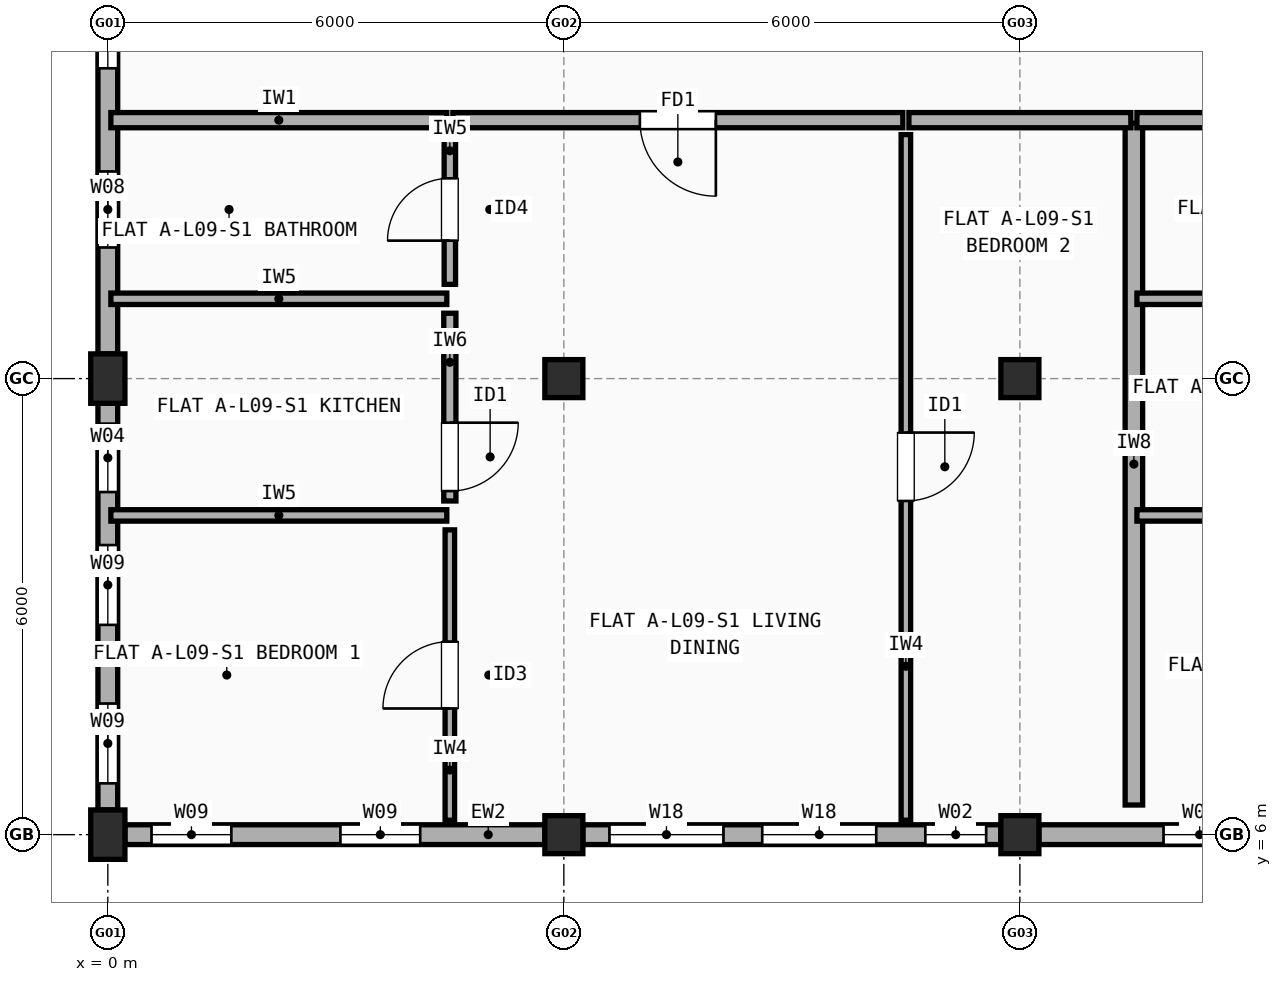
"""IFC4 building model, lengths in metres.
Left out: names, types, materials, properties, quantities, classifications, styles, units other than length and angle.
Written with IfcOpenShell. Run it as: python <this file> out.ifc"""

import sys

from ifc_helpers import new_model, si_unit, direction, frame, frame_2d, origin, origin_2d, place, context, subcontext, project, spatial, rectangle, extrude, element, fill, save


model = new_model("IFC4")
c1 = context("Model", 3, precision=1e-05, world=origin(), true_north=direction((0.0, 1.0)))
c2 = subcontext(c1, "Body", "Model", "MODEL_VIEW")
j1 = project(units=[si_unit("LENGTHUNIT", "METRE"), si_unit("PLANEANGLEUNIT", "RADIAN")], contexts=[c1])
p1 = place(None, origin())
s1 = spatial("IfcSite", under=j1, at=p1, CompositionType="ELEMENT")
p2 = place(p1, origin())
s2 = spatial("IfcBuilding", under=s1, at=p2, CompositionType="ELEMENT")
p3 = place(p2, frame((0.0, 0.0, 30.1)))
s3 = spatial("IfcBuildingStorey", under=s2, at=p3, CompositionType="ELEMENT", Elevation=30.1)
for number, where, z_axis, x_axis in (
    (1, (0.0, 6.0, 0.0), (0.0, 0.0, 1.0), (1.0, 0.0, 0.0)),
    (2, (0.0, 12.0, 0.0), (0.0, 0.0, 1.0), (1.0, 0.0, 0.0)),
):
    element("IfcColumn", number, at=place(p3, frame(where, z_axis=z_axis, x_axis=x_axis)), inside=s3, PredefinedType="COLUMN", context=c2, shape_type="SweptSolid", body=[
        extrude(rectangle(XDim=0.45, YDim=0.65, at=origin_2d()), origin(), (0.0, 0.0, 1.0), 2.985),
    ])
for number, where, z_axis, x_axis in (
    (3, (6.0, 6.0, 0.0), (0.0, 0.0, 1.0), (1.0, 0.0, 0.0)),
    (4, (6.0, 12.0, 0.0), (0.0, 0.0, 1.0), (1.0, 0.0, 0.0)),
    (5, (12.0, 6.0, 0.0), (0.0, 0.0, 1.0), (1.0, 0.0, 0.0)),
    (6, (12.0, 12.0, 0.0), (0.0, 0.0, 1.0), (1.0, 0.0, 0.0)),
):
    element("IfcColumn", number, at=place(p3, frame(where, z_axis=z_axis, x_axis=x_axis)), inside=s3, PredefinedType="COLUMN", context=c2, shape_type="SweptSolid", body=[
        extrude(rectangle(XDim=0.5, YDim=0.5, at=origin_2d()), origin(), (0.0, 0.0, 1.0), 2.985),
    ])
p4 = place(p3, frame((0.225, 6.0, 0.0), z_axis=(0.0, 0.0, 1.0), x_axis=(1.0, 0.0, 0.0)))
e7 = element("IfcWall", 7, at=p4, inside=s3, PredefinedType="STANDARD", context=c2, shape_type="SweptSolid", body=[
    extrude(rectangle(XDim=5.525, YDim=0.26, at=frame_2d((2.762, 0.0))), origin(), (0.0, 0.0, 1.0), 2.467),
])
p5 = place(p4, frame((0.35, 0.0, 0.9)))
e8 = element("IfcOpeningElement", 8, at=p5, cuts=e7, PredefinedType="OPENING", context=c2, shape_type="SweptSolid", body=[
    extrude(rectangle(XDim=1.05, YDim=1.35, at=frame_2d((0.525, 0.675))), frame((0.0, 0.14, 0.0), z_axis=(0.0, -1.0, 0.0), x_axis=(1.0, 0.0, 0.0)), (0.0, 0.0, 1.0), 0.28),
])
p6 = place(p4, frame((2.835, 0.0, 0.9)))
e9 = element("IfcOpeningElement", 9, at=p6, cuts=e7, PredefinedType="OPENING", context=c2, shape_type="SweptSolid", body=[
    extrude(rectangle(XDim=1.05, YDim=1.35, at=frame_2d((0.525, 0.675))), frame((0.0, 0.14, 0.0), z_axis=(0.0, -1.0, 0.0), x_axis=(1.0, 0.0, 0.0)), (0.0, 0.0, 1.0), 0.28),
])
p7 = place(p3, frame((6.25, 6.0, 0.0), z_axis=(0.0, 0.0, 1.0), x_axis=(1.0, 0.0, 0.0)))
e10 = element("IfcWall", 10, at=p7, inside=s3, PredefinedType="STANDARD", context=c2, shape_type="SweptSolid", body=[
    extrude(rectangle(XDim=5.5, YDim=0.26, at=frame_2d((2.75, 0.0))), origin(), (0.0, 0.0, 1.0), 2.467),
])
p8 = place(p7, frame((0.35, 0.0, 0.9)))
e11 = element("IfcOpeningElement", 11, at=p8, cuts=e10, PredefinedType="OPENING", context=c2, shape_type="SweptSolid", body=[
    extrude(rectangle(XDim=1.5, YDim=1.4, at=frame_2d((0.75, 0.7))), frame((0.0, 0.14, 0.0), z_axis=(0.0, -1.0, 0.0), x_axis=(1.0, 0.0, 0.0)), (0.0, 0.0, 1.0), 0.28),
])
p9 = place(p7, frame((2.36, 0.0, 0.9)))
e12 = element("IfcOpeningElement", 12, at=p9, cuts=e10, PredefinedType="OPENING", context=c2, shape_type="SweptSolid", body=[
    extrude(rectangle(XDim=1.5, YDim=1.4, at=frame_2d((0.75, 0.7))), frame((0.0, 0.14, 0.0), z_axis=(0.0, -1.0, 0.0), x_axis=(1.0, 0.0, 0.0)), (0.0, 0.0, 1.0), 0.28),
])
p10 = place(p7, frame((4.506, 0.0, 0.9)))
e13 = element("IfcOpeningElement", 13, at=p10, cuts=e10, PredefinedType="OPENING", context=c2, shape_type="SweptSolid", body=[
    extrude(rectangle(XDim=0.8, YDim=1.2, at=frame_2d((0.4, 0.6))), frame((0.0, 0.14, 0.0), z_axis=(0.0, -1.0, 0.0), x_axis=(1.0, 0.0, 0.0)), (0.0, 0.0, 1.0), 0.28),
])
p11 = place(p3, frame((12.25, 6.0, 0.0), z_axis=(0.0, 0.0, 1.0), x_axis=(1.0, 0.0, 0.0)))
e14 = element("IfcWall", 14, at=p11, inside=s3, PredefinedType="STANDARD", context=c2, shape_type="SweptSolid", body=[
    extrude(rectangle(XDim=5.5, YDim=0.26, at=frame_2d((2.75, 0.0))), origin(), (0.0, 0.0, 1.0), 2.467),
])
p12 = place(p11, frame((1.64, 0.0, 0.9)))
e15 = element("IfcOpeningElement", 15, at=p12, cuts=e14, PredefinedType="OPENING", context=c2, shape_type="SweptSolid", body=[
    extrude(rectangle(XDim=0.95, YDim=1.35, at=frame_2d((0.475, 0.675))), frame((0.0, 0.14, 0.0), z_axis=(0.0, -1.0, 0.0), x_axis=(1.0, 0.0, 0.0)), (0.0, 0.0, 1.0), 0.28),
])
p13 = place(p11, frame((4.2, 0.0, 0.9)))
e16 = element("IfcOpeningElement", 16, at=p13, cuts=e14, PredefinedType="OPENING", context=c2, shape_type="SweptSolid", body=[
    extrude(rectangle(XDim=0.95, YDim=1.35, at=frame_2d((0.475, 0.675))), frame((0.0, 0.14, 0.0), z_axis=(0.0, -1.0, 0.0), x_axis=(1.0, 0.0, 0.0)), (0.0, 0.0, 1.0), 0.28),
])
p14 = place(p3, frame((0.0, 17.675, 0.0), z_axis=(0.0, 0.0, 1.0), x_axis=(0.0, -1.0, 0.0)))
e17 = element("IfcWall", 17, at=p14, inside=s3, PredefinedType="STANDARD", context=c2, shape_type="SweptSolid", body=[
    extrude(rectangle(XDim=5.35, YDim=0.26, at=frame_2d((2.675, 0.0))), origin(), (0.0, 0.0, 1.0), 2.467),
])
p15 = place(p14, frame((0.643, 0.0, 0.9)))
e18 = element("IfcOpeningElement", 18, at=p15, cuts=e17, PredefinedType="OPENING", context=c2, shape_type="SweptSolid", body=[
    extrude(rectangle(XDim=0.95, YDim=1.35, at=frame_2d((0.475, 0.675))), frame((0.0, 0.14, 0.0), z_axis=(0.0, -1.0, 0.0), x_axis=(1.0, 0.0, 0.0)), (0.0, 0.0, 1.0), 0.28),
])
p16 = place(p14, frame((2.95, 0.0, 0.9)))
e19 = element("IfcOpeningElement", 19, at=p16, cuts=e17, PredefinedType="OPENING", context=c2, shape_type="SweptSolid", body=[
    extrude(rectangle(XDim=1.0, YDim=1.4, at=frame_2d((0.5, 0.7))), frame((0.0, 0.14, 0.0), z_axis=(0.0, -1.0, 0.0), x_axis=(1.0, 0.0, 0.0)), (0.0, 0.0, 1.0), 0.28),
])
p17 = place(p3, frame((0.0, 11.675, 0.0), z_axis=(0.0, 0.0, 1.0), x_axis=(0.0, -1.0, 0.0)))
e20 = element("IfcWall", 20, at=p17, inside=s3, PredefinedType="STANDARD", context=c2, shape_type="SweptSolid", body=[
    extrude(rectangle(XDim=5.35, YDim=0.26, at=frame_2d((2.675, 0.0))), origin(), (0.0, 0.0, 1.0), 2.467),
])
p18 = place(p17, frame((0.268, 0.0, 0.9)))
e21 = element("IfcOpeningElement", 21, at=p18, cuts=e20, PredefinedType="OPENING", context=c2, shape_type="SweptSolid", body=[
    extrude(rectangle(XDim=0.9, YDim=1.3, at=frame_2d((0.45, 0.65))), frame((0.0, 0.14, 0.0), z_axis=(0.0, -1.0, 0.0), x_axis=(1.0, 0.0, 0.0)), (0.0, 0.0, 1.0), 0.28),
])
p19 = place(p17, frame((1.865, 0.0, 0.9)))
e22 = element("IfcOpeningElement", 22, at=p19, cuts=e20, PredefinedType="OPENING", context=c2, shape_type="SweptSolid", body=[
    extrude(rectangle(XDim=1.05, YDim=1.35, at=frame_2d((0.525, 0.675))), frame((0.0, 0.14, 0.0), z_axis=(0.0, -1.0, 0.0), x_axis=(1.0, 0.0, 0.0)), (0.0, 0.0, 1.0), 0.28),
])
p20 = place(p17, frame((3.95, 0.0, 0.9)))
e23 = element("IfcOpeningElement", 23, at=p20, cuts=e20, PredefinedType="OPENING", context=c2, shape_type="SweptSolid", body=[
    extrude(rectangle(XDim=1.05, YDim=1.35, at=frame_2d((0.525, 0.675))), frame((0.0, 0.14, 0.0), z_axis=(0.0, -1.0, 0.0), x_axis=(1.0, 0.0, 0.0)), (0.0, 0.0, 1.0), 0.28),
])
p21 = place(p3, frame((13.5, 6.39, 0.0), z_axis=(0.0, 0.0, 1.0), x_axis=(0.0, 1.0, 0.0)))
e24 = element("IfcWall", 24, at=p21, inside=s3, PredefinedType="SOLIDWALL", context=c2, shape_type="SweptSolid", body=[
    extrude(rectangle(XDim=8.97, YDim=0.23, at=frame_2d((4.485, 0.0))), origin(), (0.0, 0.0, 1.0), 2.508),
])
p22 = place(p3, frame((0.04, 15.4, 0.0), z_axis=(0.0, 0.0, 1.0), x_axis=(1.0, 0.0, 0.0)))
e25 = element("IfcWall", 25, at=p22, inside=s3, PredefinedType="SOLIDWALL", context=c2, shape_type="SweptSolid", body=[
    extrude(rectangle(XDim=4.42, YDim=0.2, at=frame_2d((2.21, 0.0))), origin(), (0.0, 0.0, 1.0), 2.467),
])
p23 = place(p3, frame((4.54, 15.4, 0.0), z_axis=(0.0, 0.0, 1.0), x_axis=(1.0, 0.0, 0.0)))
e26 = element("IfcWall", 26, at=p23, inside=s3, PredefinedType="SOLIDWALL", context=c2, shape_type="SweptSolid", body=[
    extrude(rectangle(XDim=5.92, YDim=0.2, at=frame_2d((2.96, 0.0))), origin(), (0.0, 0.0, 1.0), 2.508),
])
p24 = place(p23, frame((2.46, 0.0, 0.0)))
e27 = element("IfcOpeningElement", 27, at=p24, cuts=e26, PredefinedType="OPENING", context=c2, shape_type="SweptSolid", body=[
    extrude(rectangle(XDim=1.0, YDim=2.15, at=frame_2d((0.5, 1.075))), frame((0.0, 0.11, 0.0), z_axis=(0.0, -1.0, 0.0), x_axis=(1.0, 0.0, 0.0)), (0.0, 0.0, 1.0), 0.22),
])
p25 = place(p3, frame((4.5, 6.19, 0.0), z_axis=(0.0, 0.0, 1.0), x_axis=(0.0, 1.0, 0.0)))
e28 = element("IfcWall", 28, at=p25, inside=s3, PredefinedType="PARTITIONING", context=c2, shape_type="SweptSolid", body=[
    extrude(rectangle(XDim=3.82, YDim=0.125, at=frame_2d((1.91, 0.0))), origin(), (0.0, 0.0, 1.0), 2.985),
])
p26 = place(p25, frame((1.47, 0.0, 0.0)))
e29 = element("IfcOpeningElement", 29, at=p26, cuts=e28, PredefinedType="OPENING", context=c2, shape_type="SweptSolid", body=[
    extrude(rectangle(XDim=0.88, YDim=2.1, at=frame_2d((0.44, 1.05))), frame((0.0, 0.073, 0.0), z_axis=(0.0, -1.0, 0.0), x_axis=(1.0, 0.0, 0.0)), (0.0, 0.0, 1.0), 0.145),
])
p27 = place(p3, frame((4.5, 10.39, 0.0), z_axis=(0.0, 0.0, 1.0), x_axis=(0.0, 1.0, 0.0)))
e30 = element("IfcWall", 30, at=p27, inside=s3, PredefinedType="PLUMBINGWALL", context=c2, shape_type="SweptSolid", body=[
    extrude(rectangle(XDim=2.47, YDim=0.16, at=frame_2d((1.235, 0.0))), origin(), (0.0, 0.0, 1.0), 2.408),
])
p28 = place(p27, frame((0.13, 0.0, 0.0)))
e31 = element("IfcOpeningElement", 31, at=p28, cuts=e30, PredefinedType="OPENING", context=c2, shape_type="SweptSolid", body=[
    extrude(rectangle(XDim=0.9, YDim=2.1, at=frame_2d((0.45, 1.05))), frame((0.0, 0.09, 0.0), z_axis=(0.0, -1.0, 0.0), x_axis=(1.0, 0.0, 0.0)), (0.0, 0.0, 1.0), 0.18),
])
p29 = place(p3, frame((4.5, 13.24, 0.0), z_axis=(0.0, 0.0, 1.0), x_axis=(0.0, 1.0, 0.0)))
e32 = element("IfcWall", 32, at=p29, inside=s3, PredefinedType="PARTITIONING", context=c2, shape_type="SweptSolid", body=[
    extrude(rectangle(XDim=1.97, YDim=0.15, at=frame_2d((0.985, 0.0))), origin(), (0.0, 0.0, 1.0), 2.985),
])
p30 = place(p29, frame((0.575, 0.0, 0.0)))
e33 = element("IfcOpeningElement", 33, at=p30, cuts=e32, PredefinedType="OPENING", context=c2, shape_type="SweptSolid", body=[
    extrude(rectangle(XDim=0.82, YDim=2.08, at=frame_2d((0.41, 1.04))), frame((0.0, 0.085, 0.0), z_axis=(0.0, -1.0, 0.0), x_axis=(1.0, 0.0, 0.0)), (0.0, 0.0, 1.0), 0.17),
])
for number, where, z_axis, x_axis in (
    (34, (0.04, 10.2, 0.0), (0.0, 0.0, 1.0), (1.0, 0.0, 0.0)),
    (35, (0.04, 13.05, 0.0), (0.0, 0.0, 1.0), (1.0, 0.0, 0.0)),
):
    element("IfcWall", number, at=place(p3, frame(where, z_axis=z_axis, x_axis=x_axis)), inside=s3, PredefinedType="PARTITIONING", context=c2, shape_type="SweptSolid", body=[
        extrude(rectangle(XDim=4.42, YDim=0.15, at=frame_2d((2.21, 0.0))), origin(), (0.0, 0.0, 1.0), 2.467),
    ])
p31 = place(p3, frame((10.54, 15.4, 0.0), z_axis=(0.0, 0.0, 1.0), x_axis=(1.0, 0.0, 0.0)))
e36 = element("IfcWall", 36, at=p31, inside=s3, PredefinedType="SOLIDWALL", context=c2, shape_type="SweptSolid", body=[
    extrude(rectangle(XDim=2.92, YDim=0.2, at=frame_2d((1.46, 0.0))), origin(), (0.0, 0.0, 1.0), 2.508),
])
p32 = place(p3, frame((10.5, 6.19, 0.0), z_axis=(0.0, 0.0, 1.0), x_axis=(0.0, 1.0, 0.0)))
e37 = element("IfcWall", 37, at=p32, inside=s3, PredefinedType="PARTITIONING", context=c2, shape_type="SweptSolid", body=[
    extrude(rectangle(XDim=9.02, YDim=0.125, at=frame_2d((4.51, 0.0))), origin(), (0.0, 0.0, 1.0), 2.548),
])
p33 = place(p32, frame((4.2, 0.0, 0.0)))
e38 = element("IfcOpeningElement", 38, at=p33, cuts=e37, PredefinedType="OPENING", context=c2, shape_type="SweptSolid", body=[
    extrude(rectangle(XDim=0.9, YDim=2.1, at=frame_2d((0.45, 1.05))), frame((0.0, 0.073, 0.0), z_axis=(0.0, -1.0, 0.0), x_axis=(1.0, 0.0, 0.0)), (0.0, 0.0, 1.0), 0.145),
])
p34 = place(p3, frame((13.54, 15.4, 0.0), z_axis=(0.0, 0.0, 1.0), x_axis=(1.0, 0.0, 0.0)))
e39 = element("IfcWall", 39, at=p34, inside=s3, PredefinedType="SOLIDWALL", context=c2, shape_type="SweptSolid", body=[
    extrude(rectangle(XDim=4.42, YDim=0.2, at=frame_2d((2.21, 0.0))), origin(), (0.0, 0.0, 1.0), 2.458),
])
p35 = place(p3, frame((13.54, 10.2, 0.0), z_axis=(0.0, 0.0, 1.0), x_axis=(1.0, 0.0, 0.0)))
e40 = element("IfcWall", 40, at=p35, inside=s3, PredefinedType="PARTITIONING", context=c2, shape_type="SweptSolid", body=[
    extrude(rectangle(XDim=4.42, YDim=0.15, at=frame_2d((2.21, 0.0))), origin(), (0.0, 0.0, 1.0), 2.508),
])
p36 = place(p3, frame((13.54, 13.05, 0.0), z_axis=(0.0, 0.0, 1.0), x_axis=(1.0, 0.0, 0.0)))
e41 = element("IfcWall", 41, at=p36, inside=s3, PredefinedType="PARTITIONING", context=c2, shape_type="SweptSolid", body=[
    extrude(rectangle(XDim=4.42, YDim=0.15, at=frame_2d((2.21, 0.0))), origin(), (0.0, 0.0, 1.0), 2.458),
])
p37 = place(p5, origin())
e42 = element("IfcWindow", 42, at=p37, inside=s3, PartitioningType="SINGLE_PANEL", PredefinedType="WINDOW", context=c2, shape_type="SweptSolid", body=[
    extrude(rectangle(XDim=1.05, YDim=1.35, at=frame_2d((0.525, 0.675))), frame((0.0, 0.03, 0.0), z_axis=(0.0, -1.0, 0.0), x_axis=(1.0, 0.0, 0.0)), (0.0, 0.0, 1.0), 0.06),
])
fill(e8, e42)
p38 = place(p6, origin())
e43 = element("IfcWindow", 43, at=p38, inside=s3, PartitioningType="SINGLE_PANEL", PredefinedType="WINDOW", context=c2, shape_type="SweptSolid", body=[
    extrude(rectangle(XDim=1.05, YDim=1.35, at=frame_2d((0.525, 0.675))), frame((0.0, 0.03, 0.0), z_axis=(0.0, -1.0, 0.0), x_axis=(1.0, 0.0, 0.0)), (0.0, 0.0, 1.0), 0.06),
])
fill(e9, e43)
p39 = place(p8, origin())
e44 = element("IfcWindow", 44, at=p39, inside=s3, PartitioningType="SINGLE_PANEL", PredefinedType="WINDOW", context=c2, shape_type="SweptSolid", body=[
    extrude(rectangle(XDim=1.5, YDim=1.4, at=frame_2d((0.75, 0.7))), frame((0.0, 0.03, 0.0), z_axis=(0.0, -1.0, 0.0), x_axis=(1.0, 0.0, 0.0)), (0.0, 0.0, 1.0), 0.06),
])
fill(e11, e44)
p40 = place(p9, origin())
e45 = element("IfcWindow", 45, at=p40, inside=s3, PartitioningType="SINGLE_PANEL", PredefinedType="WINDOW", context=c2, shape_type="SweptSolid", body=[
    extrude(rectangle(XDim=1.5, YDim=1.4, at=frame_2d((0.75, 0.7))), frame((0.0, 0.03, 0.0), z_axis=(0.0, -1.0, 0.0), x_axis=(1.0, 0.0, 0.0)), (0.0, 0.0, 1.0), 0.06),
])
fill(e12, e45)
p41 = place(p12, origin())
e46 = element("IfcWindow", 46, at=p41, inside=s3, PartitioningType="SINGLE_PANEL", PredefinedType="WINDOW", context=c2, shape_type="SweptSolid", body=[
    extrude(rectangle(XDim=0.95, YDim=1.35, at=frame_2d((0.475, 0.675))), frame((0.0, 0.03, 0.0), z_axis=(0.0, -1.0, 0.0), x_axis=(1.0, 0.0, 0.0)), (0.0, 0.0, 1.0), 0.06),
])
fill(e15, e46)
p42 = place(p15, origin())
e47 = element("IfcWindow", 47, at=p42, inside=s3, PartitioningType="SINGLE_PANEL", PredefinedType="WINDOW", context=c2, shape_type="SweptSolid", body=[
    extrude(rectangle(XDim=0.95, YDim=1.35, at=frame_2d((0.475, 0.675))), frame((0.0, 0.03, 0.0), z_axis=(0.0, -1.0, 0.0), x_axis=(1.0, 0.0, 0.0)), (0.0, 0.0, 1.0), 0.06),
])
fill(e18, e47)
p43 = place(p16, origin())
e48 = element("IfcWindow", 48, at=p43, inside=s3, PartitioningType="SINGLE_PANEL", PredefinedType="WINDOW", context=c2, shape_type="SweptSolid", body=[
    extrude(rectangle(XDim=1.0, YDim=1.4, at=frame_2d((0.5, 0.7))), frame((0.0, 0.03, 0.0), z_axis=(0.0, -1.0, 0.0), x_axis=(1.0, 0.0, 0.0)), (0.0, 0.0, 1.0), 0.06),
])
fill(e19, e48)
p44 = place(p18, origin())
e49 = element("IfcWindow", 49, at=p44, inside=s3, PartitioningType="SINGLE_PANEL", PredefinedType="WINDOW", context=c2, shape_type="SweptSolid", body=[
    extrude(rectangle(XDim=0.9, YDim=1.3, at=frame_2d((0.45, 0.65))), frame((0.0, 0.03, 0.0), z_axis=(0.0, -1.0, 0.0), x_axis=(1.0, 0.0, 0.0)), (0.0, 0.0, 1.0), 0.06),
])
fill(e21, e49)
p45 = place(p19, origin())
e50 = element("IfcWindow", 50, at=p45, inside=s3, PartitioningType="SINGLE_PANEL", PredefinedType="WINDOW", context=c2, shape_type="SweptSolid", body=[
    extrude(rectangle(XDim=1.05, YDim=1.35, at=frame_2d((0.525, 0.675))), frame((0.0, 0.03, 0.0), z_axis=(0.0, -1.0, 0.0), x_axis=(1.0, 0.0, 0.0)), (0.0, 0.0, 1.0), 0.06),
])
fill(e22, e50)
p46 = place(p20, origin())
e51 = element("IfcWindow", 51, at=p46, inside=s3, PartitioningType="SINGLE_PANEL", PredefinedType="WINDOW", context=c2, shape_type="SweptSolid", body=[
    extrude(rectangle(XDim=1.05, YDim=1.35, at=frame_2d((0.525, 0.675))), frame((0.0, 0.03, 0.0), z_axis=(0.0, -1.0, 0.0), x_axis=(1.0, 0.0, 0.0)), (0.0, 0.0, 1.0), 0.06),
])
fill(e23, e51)
p47 = place(p10, origin())
e52 = element("IfcWindow", 52, at=p47, inside=s3, PartitioningType="SINGLE_PANEL", PredefinedType="WINDOW", context=c2, shape_type="SweptSolid", body=[
    extrude(rectangle(XDim=0.8, YDim=1.2, at=frame_2d((0.4, 0.6))), frame((0.0, 0.03, 0.0), z_axis=(0.0, -1.0, 0.0), x_axis=(1.0, 0.0, 0.0)), (0.0, 0.0, 1.0), 0.06),
])
fill(e13, e52)
p48 = place(p24, origin())
e53 = element("IfcDoor", 53, at=p48, inside=s3, OperationType="SINGLE_SWING_RIGHT", PredefinedType="DOOR", context=c2, shape_type="SweptSolid", body=[
    extrude(rectangle(XDim=1.0, YDim=2.15, at=frame_2d((0.5, 1.075))), frame((0.0, 0.025, 0.0), z_axis=(0.0, -1.0, 0.0), x_axis=(1.0, 0.0, 0.0)), (0.0, 0.0, 1.0), 0.05),
])
fill(e27, e53)
p49 = place(p26, origin())
e54 = element("IfcDoor", 54, at=p49, inside=s3, OperationType="SINGLE_SWING_LEFT", PredefinedType="DOOR", context=c2, shape_type="SweptSolid", body=[
    extrude(rectangle(XDim=0.88, YDim=2.1, at=frame_2d((0.44, 1.05))), frame((0.0, 0.025, 0.0), z_axis=(0.0, -1.0, 0.0), x_axis=(1.0, 0.0, 0.0)), (0.0, 0.0, 1.0), 0.05),
])
fill(e29, e54)
p50 = place(p28, origin())
e55 = element("IfcDoor", 55, at=p50, inside=s3, OperationType="SINGLE_SWING_RIGHT", PredefinedType="DOOR", context=c2, shape_type="SweptSolid", body=[
    extrude(rectangle(XDim=0.9, YDim=2.1, at=frame_2d((0.45, 1.05))), frame((0.0, 0.025, 0.0), z_axis=(0.0, -1.0, 0.0), x_axis=(1.0, 0.0, 0.0)), (0.0, 0.0, 1.0), 0.05),
])
fill(e31, e55)
p51 = place(p30, origin())
e56 = element("IfcDoor", 56, at=p51, inside=s3, OperationType="SINGLE_SWING_LEFT", PredefinedType="DOOR", context=c2, shape_type="SweptSolid", body=[
    extrude(rectangle(XDim=0.82, YDim=2.08, at=frame_2d((0.41, 1.04))), frame((0.0, 0.025, 0.0), z_axis=(0.0, -1.0, 0.0), x_axis=(1.0, 0.0, 0.0)), (0.0, 0.0, 1.0), 0.05),
])
fill(e33, e56)
p52 = place(p33, origin())
e57 = element("IfcDoor", 57, at=p52, inside=s3, OperationType="SINGLE_SWING_RIGHT", PredefinedType="DOOR", context=c2, shape_type="SweptSolid", body=[
    extrude(rectangle(XDim=0.9, YDim=2.1, at=frame_2d((0.45, 1.05))), frame((0.0, 0.025, 0.0), z_axis=(0.0, -1.0, 0.0), x_axis=(1.0, 0.0, 0.0)), (0.0, 0.0, 1.0), 0.05),
])
fill(e38, e57)
save(model, sys.argv[1])
